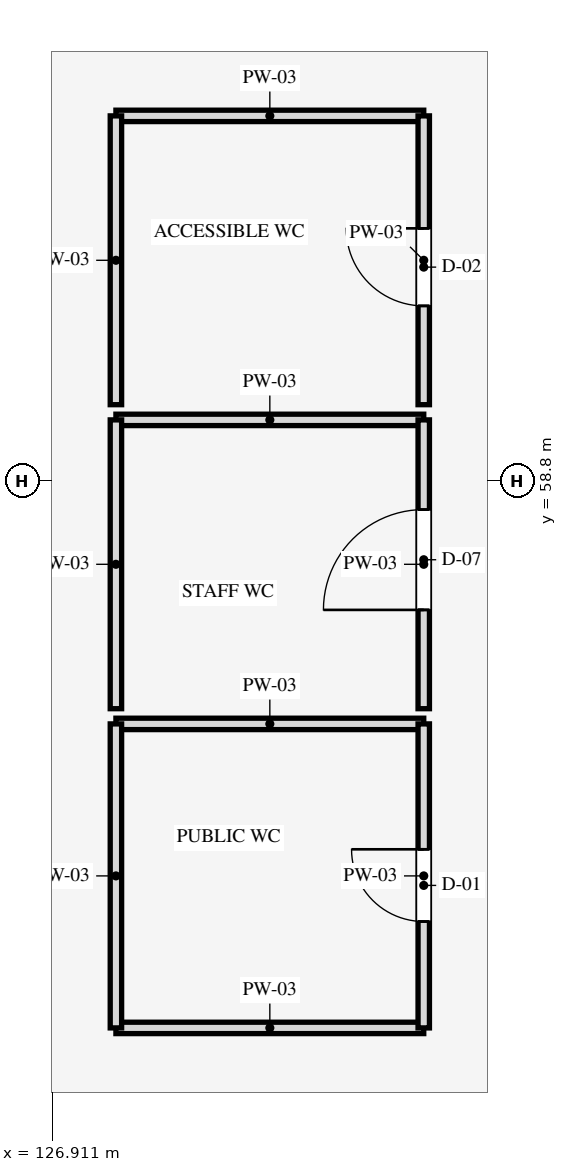
"""IFC4 building model, lengths in metres.
Left out: names, types, materials, properties, quantities, classifications, styles, units other than length and angle.
Written with IfcOpenShell. Run it as: python <this file> out.ifc"""

import sys

from ifc_helpers import new_model, si_unit, direction, frame, frame_2d, origin, place, context, subcontext, project, spatial, rectangle, extrude, element, fill, save


model = new_model("IFC4")
c1 = context("Model", 3, precision=1e-05, world=origin(), true_north=direction((0.0, 1.0)))
c2 = subcontext(c1, "Body", "Model", "MODEL_VIEW")
j1 = project(units=[si_unit("LENGTHUNIT", "METRE"), si_unit("PLANEANGLEUNIT", "RADIAN")], contexts=[c1])
p1 = place(None, origin())
s1 = spatial("IfcSite", under=j1, at=p1, CompositionType="ELEMENT")
p2 = place(p1, origin())
s2 = spatial("IfcBuilding", under=s1, at=p2, CompositionType="ELEMENT")
p3 = place(p2, frame((0.0, 0.0, 18.9)))
s3 = spatial("IfcBuildingStorey", under=s2, at=p3, CompositionType="ELEMENT", Elevation=18.9)
for number, where, z_axis, x_axis in (
    (1, (127.75, 51.6, 0.0), (0.0, 0.0, 1.0), (1.0, 0.0, 0.0)),
    (2, (127.75, 55.6, 0.0), (0.0, 0.0, 1.0), (1.0, 0.0, 0.0)),
):
    element("IfcWall", number, at=place(p3, frame(where, z_axis=z_axis, x_axis=x_axis)), inside=s3, PredefinedType="PARTITIONING", context=c2, shape_type="SweptSolid", body=[
        extrude(rectangle(XDim=4.05, YDim=0.15, at=frame_2d((2.025, 0.0))), origin(), (0.0, 0.0, 1.0), 3.54),
    ])
p4 = place(p3, frame((127.75, 51.6, 0.0), z_axis=(0.0, 0.0, 1.0), x_axis=(0.0, 1.0, 0.0)))
e3 = element("IfcWall", 3, at=p4, inside=s3, PredefinedType="PARTITIONING", context=c2, shape_type="SweptSolid", body=[
    extrude(rectangle(XDim=4.0, YDim=0.15, at=frame_2d((2.0, 0.0))), origin(), (0.0, 0.0, 1.0), 3.54),
])
p5 = place(p3, frame((131.8, 51.6, 0.0), z_axis=(0.0, 0.0, 1.0), x_axis=(0.0, 1.0, 0.0)))
e4 = element("IfcWall", 4, at=p5, inside=s3, PredefinedType="PARTITIONING", context=c2, shape_type="SweptSolid", body=[
    extrude(rectangle(XDim=4.0, YDim=0.15, at=frame_2d((2.0, 0.0))), origin(), (0.0, 0.0, 1.0), 3.54),
])
p6 = place(p5, frame((1.4, 0.0, 0.0)))
e5 = element("IfcOpeningElement", 5, at=p6, cuts=e4, PredefinedType="OPENING", context=c2, shape_type="SweptSolid", body=[
    extrude(rectangle(XDim=0.95, YDim=2.1, at=frame_2d((0.475, 1.05))), frame((0.0, 0.085, 0.0), z_axis=(0.0, -1.0, 0.0), x_axis=(1.0, 0.0, 0.0)), (0.0, 0.0, 1.0), 0.17),
])
p7 = place(p3, frame((127.75, 59.6, 0.0), z_axis=(0.0, 0.0, 1.0), x_axis=(1.0, 0.0, 0.0)))
e6 = element("IfcWall", 6, at=p7, inside=s3, PredefinedType="PARTITIONING", context=c2, shape_type="SweptSolid", body=[
    extrude(rectangle(XDim=4.05, YDim=0.15, at=frame_2d((2.025, 0.0))), origin(), (0.0, 0.0, 1.0), 3.54),
])
p8 = place(p3, frame((127.75, 55.8, 0.0), z_axis=(0.0, 0.0, 1.0), x_axis=(0.0, 1.0, 0.0)))
e7 = element("IfcWall", 7, at=p8, inside=s3, PredefinedType="PARTITIONING", context=c2, shape_type="SweptSolid", body=[
    extrude(rectangle(XDim=3.8, YDim=0.15, at=frame_2d((1.9, 0.0))), origin(), (0.0, 0.0, 1.0), 3.54),
])
p9 = place(p3, frame((131.8, 55.8, 0.0), z_axis=(0.0, 0.0, 1.0), x_axis=(0.0, 1.0, 0.0)))
e8 = element("IfcWall", 8, at=p9, inside=s3, PredefinedType="PARTITIONING", context=c2, shape_type="SweptSolid", body=[
    extrude(rectangle(XDim=3.8, YDim=0.15, at=frame_2d((1.9, 0.0))), origin(), (0.0, 0.0, 1.0), 3.54),
])
p10 = place(p9, frame((1.3, 0.0, 0.0)))
e9 = element("IfcOpeningElement", 9, at=p10, cuts=e8, PredefinedType="OPENING", context=c2, shape_type="SweptSolid", body=[
    extrude(rectangle(XDim=1.32, YDim=2.18, at=frame_2d((0.66, 1.09))), frame((0.0, 0.085, 0.0), z_axis=(0.0, -1.0, 0.0), x_axis=(1.0, 0.0, 0.0)), (0.0, 0.0, 1.0), 0.17),
])
p11 = place(p3, frame((127.75, 63.6, 0.0), z_axis=(0.0, 0.0, 1.0), x_axis=(1.0, 0.0, 0.0)))
e10 = element("IfcWall", 10, at=p11, inside=s3, PredefinedType="PARTITIONING", context=c2, shape_type="SweptSolid", body=[
    extrude(rectangle(XDim=4.05, YDim=0.15, at=frame_2d((2.025, 0.0))), origin(), (0.0, 0.0, 1.0), 3.54),
])
p12 = place(p3, frame((127.75, 59.8, 0.0), z_axis=(0.0, 0.0, 1.0), x_axis=(0.0, 1.0, 0.0)))
e11 = element("IfcWall", 11, at=p12, inside=s3, PredefinedType="PARTITIONING", context=c2, shape_type="SweptSolid", body=[
    extrude(rectangle(XDim=3.8, YDim=0.15, at=frame_2d((1.9, 0.0))), origin(), (0.0, 0.0, 1.0), 3.54),
])
p13 = place(p3, frame((131.8, 59.8, 0.0), z_axis=(0.0, 0.0, 1.0), x_axis=(0.0, 1.0, 0.0)))
e12 = element("IfcWall", 12, at=p13, inside=s3, PredefinedType="PARTITIONING", context=c2, shape_type="SweptSolid", body=[
    extrude(rectangle(XDim=3.8, YDim=0.15, at=frame_2d((1.9, 0.0))), origin(), (0.0, 0.0, 1.0), 3.54),
])
p14 = place(p13, frame((1.3, 0.0, 0.0)))
e13 = element("IfcOpeningElement", 13, at=p14, cuts=e12, PredefinedType="OPENING", context=c2, shape_type="SweptSolid", body=[
    extrude(rectangle(XDim=1.02, YDim=2.1, at=frame_2d((0.51, 1.05))), frame((0.0, 0.085, 0.0), z_axis=(0.0, -1.0, 0.0), x_axis=(1.0, 0.0, 0.0)), (0.0, 0.0, 1.0), 0.17),
])
p15 = place(p6, origin())
e14 = element("IfcDoor", 14, at=p15, inside=s3, OperationType="SINGLE_SWING_RIGHT", PredefinedType="DOOR", context=c2, shape_type="SweptSolid", body=[
    extrude(rectangle(XDim=0.95, YDim=2.1, at=frame_2d((0.475, 1.05))), frame((0.0, 0.025, 0.0), z_axis=(0.0, -1.0, 0.0), x_axis=(1.0, 0.0, 0.0)), (0.0, 0.0, 1.0), 0.05),
])
fill(e5, e14)
p16 = place(p10, origin())
e15 = element("IfcDoor", 15, at=p16, inside=s3, OperationType="SINGLE_SWING_LEFT", PredefinedType="DOOR", context=c2, shape_type="SweptSolid", body=[
    extrude(rectangle(XDim=1.32, YDim=2.18, at=frame_2d((0.66, 1.09))), frame((0.0, 0.025, 0.0), z_axis=(0.0, -1.0, 0.0), x_axis=(1.0, 0.0, 0.0)), (0.0, 0.0, 1.0), 0.05),
])
fill(e9, e15)
p17 = place(p14, origin())
e16 = element("IfcDoor", 16, at=p17, inside=s3, OperationType="SINGLE_SWING_RIGHT", PredefinedType="DOOR", context=c2, shape_type="SweptSolid", body=[
    extrude(rectangle(XDim=1.02, YDim=2.1, at=frame_2d((0.51, 1.05))), frame((0.0, 0.025, 0.0), z_axis=(0.0, -1.0, 0.0), x_axis=(1.0, 0.0, 0.0)), (0.0, 0.0, 1.0), 0.05),
])
fill(e13, e16)
save(model, sys.argv[1])
